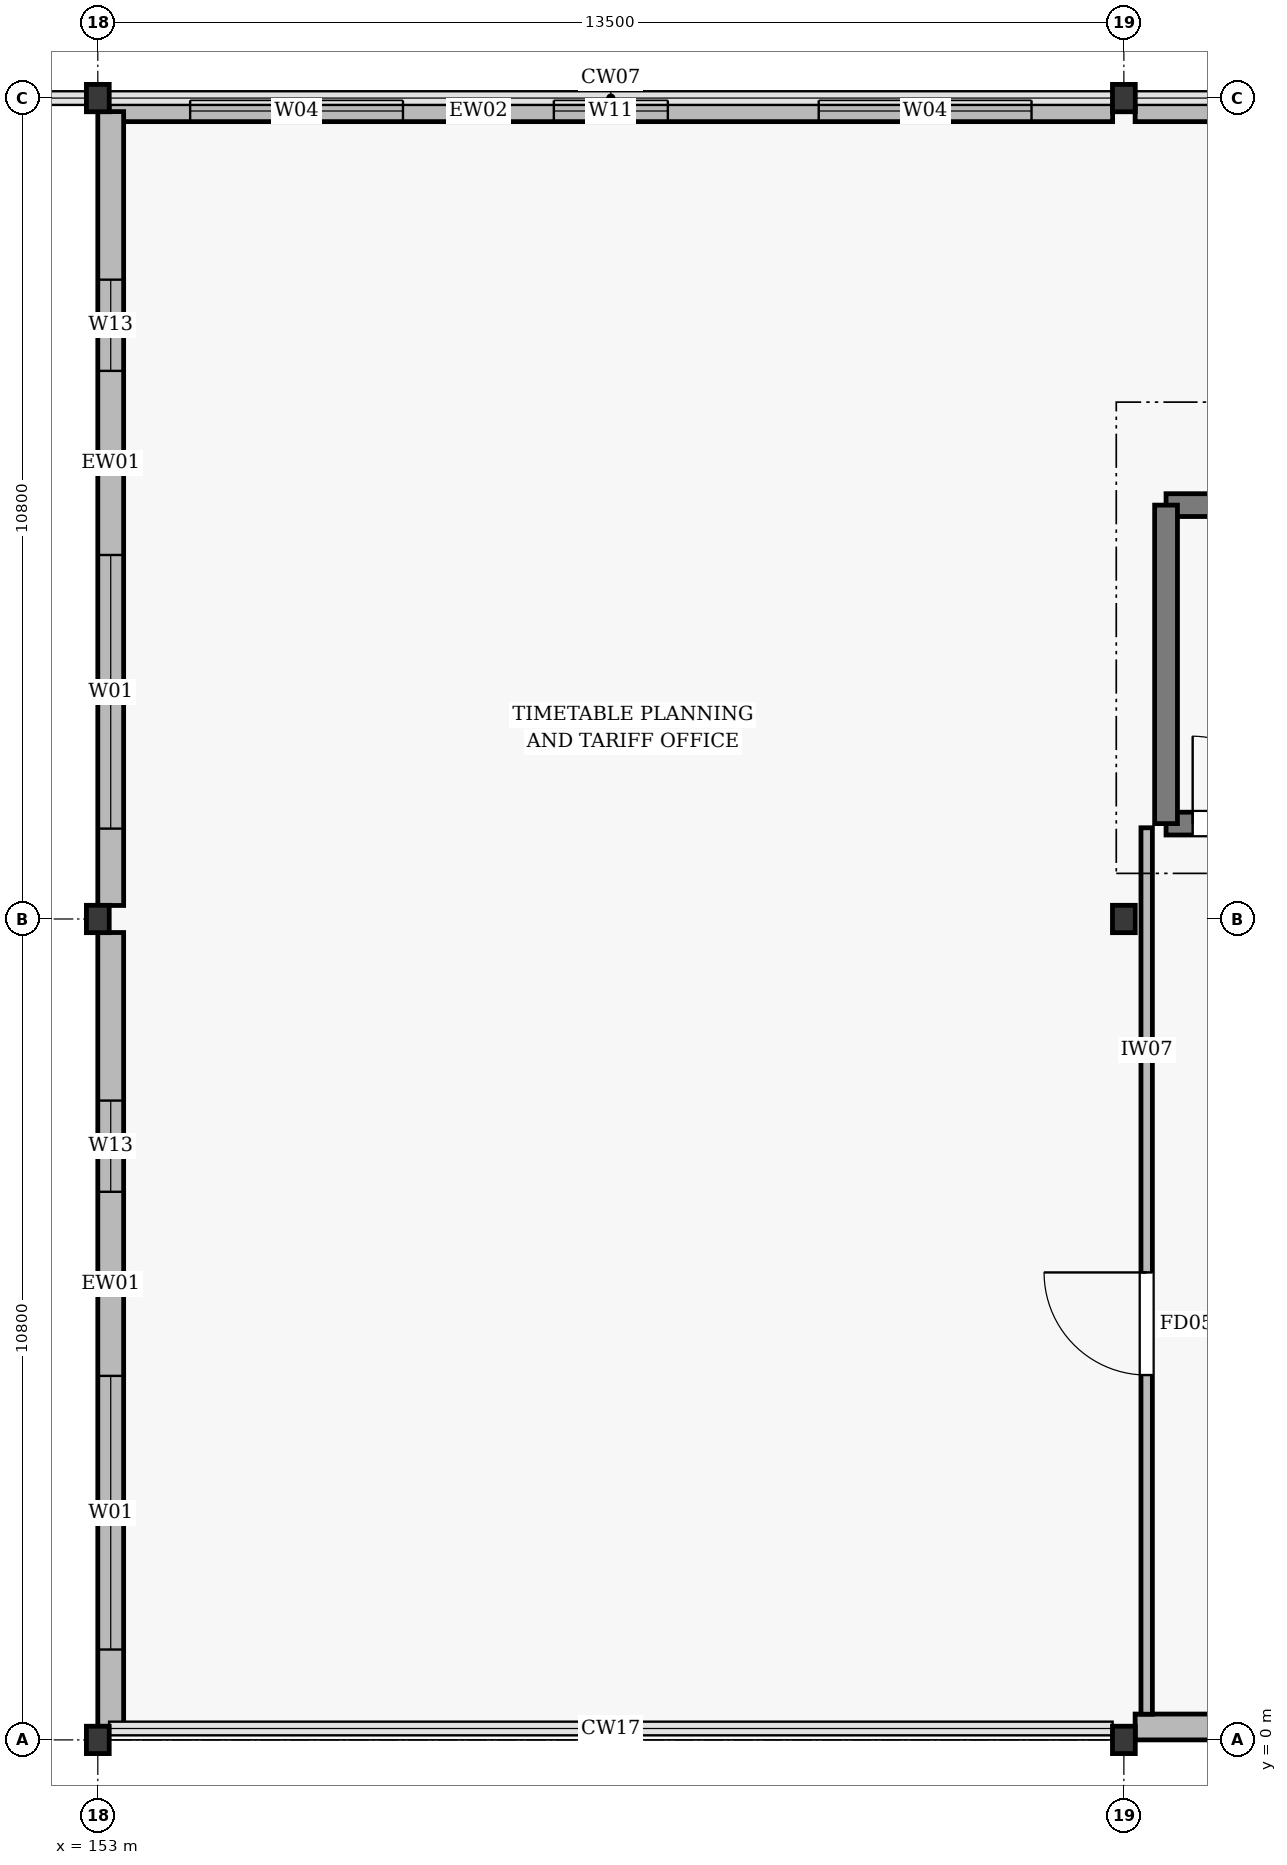
"""IFC4 building model, lengths in metres.
Left out: names, types, materials, properties, quantities, classifications, styles, units other than length and angle.
Written with IfcOpenShell. Run it as: python <this file> out.ifc"""

import sys

from ifc_helpers import new_model, si_unit, direction, frame, frame_2d, origin, origin_2d, place, context, subcontext, project, spatial, rectangle, i_section, extrude, element, fill, save


model = new_model("IFC4")
c1 = context("Model", 3, precision=1e-05, world=origin(), true_north=direction((0.0, 1.0)))
c2 = subcontext(c1, "Body", "Model", "MODEL_VIEW")
j1 = project(units=[si_unit("LENGTHUNIT", "METRE"), si_unit("PLANEANGLEUNIT", "RADIAN")], contexts=[c1])
p1 = place(None, origin())
s1 = spatial("IfcSite", under=j1, at=p1, CompositionType="ELEMENT")
p2 = place(p1, origin())
s2 = spatial("IfcBuilding", under=s1, at=p2, CompositionType="ELEMENT")
p3 = place(p2, frame((0.0, 0.0, 12.6)))
s3 = spatial("IfcBuildingStorey", under=s2, at=p3, CompositionType="ELEMENT", Elevation=12.6)
for number, where, z_axis, x_axis in (
    (1, (153.0, 0.0, 0.0), (0.0, 0.0, 1.0), (1.0, 0.0, 0.0)),
    (2, (153.0, 10.8, 0.0), (0.0, 0.0, 1.0), (1.0, 0.0, 0.0)),
    (3, (153.0, 21.6, 0.0), (0.0, 0.0, 1.0), (1.0, 0.0, 0.0)),
    (4, (166.5, 0.0, 0.0), (0.0, 0.0, 1.0), (1.0, 0.0, 0.0)),
    (5, (166.5, 10.8, 0.0), (0.0, 0.0, 1.0), (1.0, 0.0, 0.0)),
    (6, (166.5, 21.6, 0.0), (0.0, 0.0, 1.0), (1.0, 0.0, 0.0)),
):
    element("IfcColumn", number, at=place(p3, frame(where, z_axis=z_axis, x_axis=x_axis)), inside=s3, PredefinedType="COLUMN", context=c2, shape_type="SweptSolid", body=[
        extrude(i_section(OverallWidth=0.3, OverallDepth=0.36, WebThickness=0.012, FlangeThickness=0.022, at=origin_2d()), origin(), (0.0, 0.0, 1.0), 4.8),
    ])
p4 = place(p3, frame((166.648, 0.17, 0.0), z_axis=(0.0, 0.0, 1.0), x_axis=(1.0, 0.0, 0.0)))
e7 = element("IfcWall", 7, at=p4, inside=s3, PredefinedType="STANDARD", context=c2, shape_type="SweptSolid", body=[
    extrude(rectangle(XDim=13.204, YDim=0.34, at=frame_2d((6.602, 0.0))), origin(), (0.0, 0.0, 1.0), 3.9),
])
p5 = place(p4, frame((1.067, 0.0, 0.75)))
e8 = element("IfcOpeningElement", 8, at=p5, cuts=e7, PredefinedType="OPENING", context=c2, shape_type="SweptSolid", body=[
    extrude(rectangle(XDim=2.8, YDim=2.6, at=frame_2d((1.4, 1.3))), frame((0.0, 0.182, 0.0), z_axis=(0.0, -1.0, 0.0), x_axis=(1.0, 0.0, 0.0)), (0.0, 0.0, 1.0), 0.364),
])
p6 = place(p4, frame((4.802, 0.0, 1.05)))
e9 = element("IfcOpeningElement", 9, at=p6, cuts=e7, PredefinedType="OPENING", context=c2, shape_type="SweptSolid", body=[
    extrude(rectangle(XDim=3.6, YDim=1.4, at=frame_2d((1.8, 0.7))), frame((0.0, 0.182, 0.0), z_axis=(0.0, -1.0, 0.0), x_axis=(1.0, 0.0, 0.0)), (0.0, 0.0, 1.0), 0.364),
])
p7 = place(p4, frame((9.337, 0.0, 0.75)))
e10 = element("IfcOpeningElement", 10, at=p7, cuts=e7, PredefinedType="OPENING", context=c2, shape_type="SweptSolid", body=[
    extrude(rectangle(XDim=2.8, YDim=2.6, at=frame_2d((1.4, 1.3))), frame((0.0, 0.182, 0.0), z_axis=(0.0, -1.0, 0.0), x_axis=(1.0, 0.0, 0.0)), (0.0, 0.0, 1.0), 0.364),
])
p8 = place(p3, frame((153.148, 21.43, 0.0), z_axis=(0.0, 0.0, 1.0), x_axis=(1.0, 0.0, 0.0)))
e11 = element("IfcWall", 11, at=p8, inside=s3, PredefinedType="STANDARD", context=c2, shape_type="SweptSolid", body=[
    extrude(rectangle(XDim=13.204, YDim=0.28, at=frame_2d((6.602, 0.0))), origin(), (0.0, 0.0, 1.0), 3.9),
])
p9 = place(p8, frame((1.067, 0.0, 0.75)))
e12 = element("IfcOpeningElement", 12, at=p9, cuts=e11, PredefinedType="OPENING", context=c2, shape_type="SweptSolid", body=[
    extrude(rectangle(XDim=2.8, YDim=2.6, at=frame_2d((1.4, 1.3))), frame((0.0, 0.152, 0.0), z_axis=(0.0, -1.0, 0.0), x_axis=(1.0, 0.0, 0.0)), (0.0, 0.0, 1.0), 0.304),
])
p10 = place(p8, frame((5.852, 0.0, 0.75)))
e13 = element("IfcOpeningElement", 13, at=p10, cuts=e11, PredefinedType="OPENING", context=c2, shape_type="SweptSolid", body=[
    extrude(rectangle(XDim=1.5, YDim=2.0, at=frame_2d((0.75, 1.0))), frame((0.0, 0.152, 0.0), z_axis=(0.0, -1.0, 0.0), x_axis=(1.0, 0.0, 0.0)), (0.0, 0.0, 1.0), 0.304),
])
p11 = place(p8, frame((9.337, 0.0, 0.75)))
e14 = element("IfcOpeningElement", 14, at=p11, cuts=e11, PredefinedType="OPENING", context=c2, shape_type="SweptSolid", body=[
    extrude(rectangle(XDim=2.8, YDim=2.6, at=frame_2d((1.4, 1.3))), frame((0.0, 0.152, 0.0), z_axis=(0.0, -1.0, 0.0), x_axis=(1.0, 0.0, 0.0)), (0.0, 0.0, 1.0), 0.304),
])
p12 = place(p3, frame((166.648, 21.43, 0.0), z_axis=(0.0, 0.0, 1.0), x_axis=(1.0, 0.0, 0.0)))
e15 = element("IfcWall", 15, at=p12, inside=s3, PredefinedType="STANDARD", context=c2, shape_type="SweptSolid", body=[
    extrude(rectangle(XDim=13.204, YDim=0.28, at=frame_2d((6.602, 0.0))), origin(), (0.0, 0.0, 1.0), 3.9),
])
p13 = place(p12, frame((1.067, 0.0, 0.75)))
e16 = element("IfcOpeningElement", 16, at=p13, cuts=e15, PredefinedType="OPENING", context=c2, shape_type="SweptSolid", body=[
    extrude(rectangle(XDim=2.8, YDim=2.6, at=frame_2d((1.4, 1.3))), frame((0.0, 0.152, 0.0), z_axis=(0.0, -1.0, 0.0), x_axis=(1.0, 0.0, 0.0)), (0.0, 0.0, 1.0), 0.304),
])
p14 = place(p12, frame((5.852, 0.0, 0.75)))
e17 = element("IfcOpeningElement", 17, at=p14, cuts=e15, PredefinedType="OPENING", context=c2, shape_type="SweptSolid", body=[
    extrude(rectangle(XDim=1.5, YDim=2.0, at=frame_2d((0.75, 1.0))), frame((0.0, 0.152, 0.0), z_axis=(0.0, -1.0, 0.0), x_axis=(1.0, 0.0, 0.0)), (0.0, 0.0, 1.0), 0.304),
])
p15 = place(p12, frame((9.337, 0.0, 0.75)))
e18 = element("IfcOpeningElement", 18, at=p15, cuts=e15, PredefinedType="OPENING", context=c2, shape_type="SweptSolid", body=[
    extrude(rectangle(XDim=2.8, YDim=2.6, at=frame_2d((1.4, 1.3))), frame((0.0, 0.152, 0.0), z_axis=(0.0, -1.0, 0.0), x_axis=(1.0, 0.0, 0.0)), (0.0, 0.0, 1.0), 0.304),
])
p16 = place(p3, frame((153.17, 0.178, 0.0), z_axis=(0.0, 0.0, 1.0), x_axis=(0.0, 1.0, 0.0)))
e19 = element("IfcWall", 19, at=p16, inside=s3, PredefinedType="STANDARD", context=c2, shape_type="SweptSolid", body=[
    extrude(rectangle(XDim=10.444, YDim=0.34, at=frame_2d((5.222, 0.0))), origin(), (0.0, 0.0, 1.0), 3.9),
])
p17 = place(p16, frame((1.011, 0.0, 0.75)))
e20 = element("IfcOpeningElement", 20, at=p17, cuts=e19, PredefinedType="OPENING", context=c2, shape_type="SweptSolid", body=[
    extrude(rectangle(XDim=3.6, YDim=2.8, at=frame_2d((1.8, 1.4))), frame((0.0, 0.182, 0.0), z_axis=(0.0, -1.0, 0.0), x_axis=(1.0, 0.0, 0.0)), (0.0, 0.0, 1.0), 0.364),
])
p18 = place(p16, frame((7.033, 0.0, 1.05)))
e21 = element("IfcOpeningElement", 21, at=p18, cuts=e19, PredefinedType="OPENING", context=c2, shape_type="SweptSolid", body=[
    extrude(rectangle(XDim=1.2, YDim=1.8, at=frame_2d((0.6, 0.9))), frame((0.0, 0.182, 0.0), z_axis=(0.0, -1.0, 0.0), x_axis=(1.0, 0.0, 0.0)), (0.0, 0.0, 1.0), 0.364),
])
p19 = place(p3, frame((153.17, 10.978, 0.0), z_axis=(0.0, 0.0, 1.0), x_axis=(0.0, 1.0, 0.0)))
e22 = element("IfcWall", 22, at=p19, inside=s3, PredefinedType="STANDARD", context=c2, shape_type="SweptSolid", body=[
    extrude(rectangle(XDim=10.444, YDim=0.34, at=frame_2d((5.222, 0.0))), origin(), (0.0, 0.0, 1.0), 3.9),
])
p20 = place(p19, frame((1.011, 0.0, 0.75)))
e23 = element("IfcOpeningElement", 23, at=p20, cuts=e22, PredefinedType="OPENING", context=c2, shape_type="SweptSolid", body=[
    extrude(rectangle(XDim=3.6, YDim=2.8, at=frame_2d((1.8, 1.4))), frame((0.0, 0.182, 0.0), z_axis=(0.0, -1.0, 0.0), x_axis=(1.0, 0.0, 0.0)), (0.0, 0.0, 1.0), 0.364),
])
p21 = place(p19, frame((7.033, 0.0, 1.05)))
e24 = element("IfcOpeningElement", 24, at=p21, cuts=e22, PredefinedType="OPENING", context=c2, shape_type="SweptSolid", body=[
    extrude(rectangle(XDim=1.2, YDim=1.8, at=frame_2d((0.6, 0.9))), frame((0.0, 0.182, 0.0), z_axis=(0.0, -1.0, 0.0), x_axis=(1.0, 0.0, 0.0)), (0.0, 0.0, 1.0), 0.364),
])
p22 = place(p3, frame((167.055, 12.055, 0.0), z_axis=(0.0, 0.0, 1.0), x_axis=(1.0, 0.0, 0.0)))
e25 = element("IfcWall", 25, at=p22, inside=s3, PredefinedType="SOLIDWALL", context=c2, shape_type="SweptSolid", body=[
    extrude(rectangle(XDim=10.04, YDim=0.3, at=frame_2d((5.02, 0.0))), origin(), (0.0, 0.0, 1.0), 4.5),
])
p23 = place(p22, frame((0.35, 0.0, 0.005)))
e26 = element("IfcOpeningElement", 26, at=p23, cuts=e25, PredefinedType="OPENING", context=c2, shape_type="SweptSolid", body=[
    extrude(rectangle(XDim=1.15, YDim=2.15, at=frame_2d((0.575, 1.075))), frame((0.0, 0.162, 0.0), z_axis=(0.0, -1.0, 0.0), x_axis=(1.0, 0.0, 0.0)), (0.0, 0.0, 1.0), 0.324),
])
p24 = place(p3, frame((167.055, 16.245, 0.0), z_axis=(0.0, 0.0, 1.0), x_axis=(1.0, 0.0, 0.0)))
e27 = element("IfcWall", 27, at=p24, inside=s3, PredefinedType="SOLIDWALL", context=c2, shape_type="SweptSolid", body=[
    extrude(rectangle(XDim=10.04, YDim=0.3, at=frame_2d((5.02, 0.0))), origin(), (0.0, 0.0, 1.0), 4.5),
])
p25 = place(p3, frame((167.055, 12.055, 0.0), z_axis=(0.0, 0.0, 1.0), x_axis=(0.0, 1.0, 0.0)))
e28 = element("IfcWall", 28, at=p25, inside=s3, PredefinedType="SOLIDWALL", context=c2, shape_type="SweptSolid", body=[
    extrude(rectangle(XDim=4.19, YDim=0.3, at=frame_2d((2.095, 0.0))), origin(), (0.0, 0.0, 1.0), 4.5),
])
p26 = place(p3, frame((166.8, 0.338, 0.0), z_axis=(0.0, 0.0, 1.0), x_axis=(0.0, 1.0, 0.0)))
e29 = element("IfcWall", 29, at=p26, inside=s3, PredefinedType="PARTITIONING", context=c2, shape_type="SweptSolid", body=[
    extrude(rectangle(XDim=11.662, YDim=0.15, at=frame_2d((5.831, 0.0))), origin(), (0.0, 0.0, 1.0), 4.08),
])
p27 = place(p26, frame((4.462, 0.0, 0.005)))
e30 = element("IfcOpeningElement", 30, at=p27, cuts=e29, PredefinedType="OPENING", context=c2, shape_type="SweptSolid", body=[
    extrude(rectangle(XDim=1.35, YDim=2.15, at=frame_2d((0.675, 1.075))), frame((0.0, 0.087, 0.0), z_axis=(0.0, -1.0, 0.0), x_axis=(1.0, 0.0, 0.0)), (0.0, 0.0, 1.0), 0.174),
])
p28 = place(p9, origin())
e31 = element("IfcWindow", 31, at=p28, inside=s3, PartitioningType="DOUBLE_PANEL_VERTICAL", PredefinedType="WINDOW", context=c2, shape_type="SweptSolid", body=[
    extrude(rectangle(XDim=2.8, YDim=2.6, at=frame_2d((1.4, 1.3))), frame((0.0, 0.03, 0.0), z_axis=(0.0, -1.0, 0.0), x_axis=(1.0, 0.0, 0.0)), (0.0, 0.0, 1.0), 0.06),
])
fill(e12, e31)
p29 = place(p10, origin())
e32 = element("IfcWindow", 32, at=p29, inside=s3, PartitioningType="DOUBLE_PANEL_VERTICAL", PredefinedType="WINDOW", context=c2, shape_type="SweptSolid", body=[
    extrude(rectangle(XDim=1.5, YDim=2.0, at=frame_2d((0.75, 1.0))), frame((0.0, 0.03, 0.0), z_axis=(0.0, -1.0, 0.0), x_axis=(1.0, 0.0, 0.0)), (0.0, 0.0, 1.0), 0.06),
])
fill(e13, e32)
p30 = place(p11, origin())
e33 = element("IfcWindow", 33, at=p30, inside=s3, PartitioningType="DOUBLE_PANEL_VERTICAL", PredefinedType="WINDOW", context=c2, shape_type="SweptSolid", body=[
    extrude(rectangle(XDim=2.8, YDim=2.6, at=frame_2d((1.4, 1.3))), frame((0.0, 0.03, 0.0), z_axis=(0.0, -1.0, 0.0), x_axis=(1.0, 0.0, 0.0)), (0.0, 0.0, 1.0), 0.06),
])
fill(e14, e33)
p31 = place(p17, origin())
e34 = element("IfcWindow", 34, at=p31, inside=s3, PartitioningType="DOUBLE_PANEL_VERTICAL", PredefinedType="WINDOW", context=c2, shape_type="SweptSolid", body=[
    extrude(rectangle(XDim=3.6, YDim=2.8, at=frame_2d((1.8, 1.4))), frame((0.0, 0.03, 0.0), z_axis=(0.0, -1.0, 0.0), x_axis=(1.0, 0.0, 0.0)), (0.0, 0.0, 1.0), 0.06),
])
fill(e20, e34)
p32 = place(p18, origin())
e35 = element("IfcWindow", 35, at=p32, inside=s3, PartitioningType="DOUBLE_PANEL_VERTICAL", PredefinedType="WINDOW", context=c2, shape_type="SweptSolid", body=[
    extrude(rectangle(XDim=1.2, YDim=1.8, at=frame_2d((0.6, 0.9))), frame((0.0, 0.03, 0.0), z_axis=(0.0, -1.0, 0.0), x_axis=(1.0, 0.0, 0.0)), (0.0, 0.0, 1.0), 0.06),
])
fill(e21, e35)
p33 = place(p20, origin())
e36 = element("IfcWindow", 36, at=p33, inside=s3, PartitioningType="DOUBLE_PANEL_VERTICAL", PredefinedType="WINDOW", context=c2, shape_type="SweptSolid", body=[
    extrude(rectangle(XDim=3.6, YDim=2.8, at=frame_2d((1.8, 1.4))), frame((0.0, 0.03, 0.0), z_axis=(0.0, -1.0, 0.0), x_axis=(1.0, 0.0, 0.0)), (0.0, 0.0, 1.0), 0.06),
])
fill(e23, e36)
p34 = place(p21, origin())
e37 = element("IfcWindow", 37, at=p34, inside=s3, PartitioningType="DOUBLE_PANEL_VERTICAL", PredefinedType="WINDOW", context=c2, shape_type="SweptSolid", body=[
    extrude(rectangle(XDim=1.2, YDim=1.8, at=frame_2d((0.6, 0.9))), frame((0.0, 0.03, 0.0), z_axis=(0.0, -1.0, 0.0), x_axis=(1.0, 0.0, 0.0)), (0.0, 0.0, 1.0), 0.06),
])
fill(e24, e37)
p35 = place(p23, origin())
e38 = element("IfcDoor", 38, at=p35, inside=s3, OperationType="SINGLE_SWING_LEFT", PredefinedType="DOOR", context=c2, shape_type="SweptSolid", body=[
    extrude(rectangle(XDim=1.15, YDim=2.15, at=frame_2d((0.575, 1.075))), frame((0.0, 0.025, 0.0), z_axis=(0.0, -1.0, 0.0), x_axis=(1.0, 0.0, 0.0)), (0.0, 0.0, 1.0), 0.05),
])
fill(e26, e38)
p36 = place(p27, origin())
e39 = element("IfcDoor", 39, at=p36, inside=s3, OperationType="SINGLE_SWING_RIGHT", PredefinedType="DOOR", context=c2, shape_type="SweptSolid", body=[
    extrude(rectangle(XDim=1.35, YDim=2.15, at=frame_2d((0.675, 1.075))), frame((0.0, 0.025, 0.0), z_axis=(0.0, -1.0, 0.0), x_axis=(1.0, 0.0, 0.0)), (0.0, 0.0, 1.0), 0.05),
])
fill(e30, e39)
save(model, sys.argv[1])
